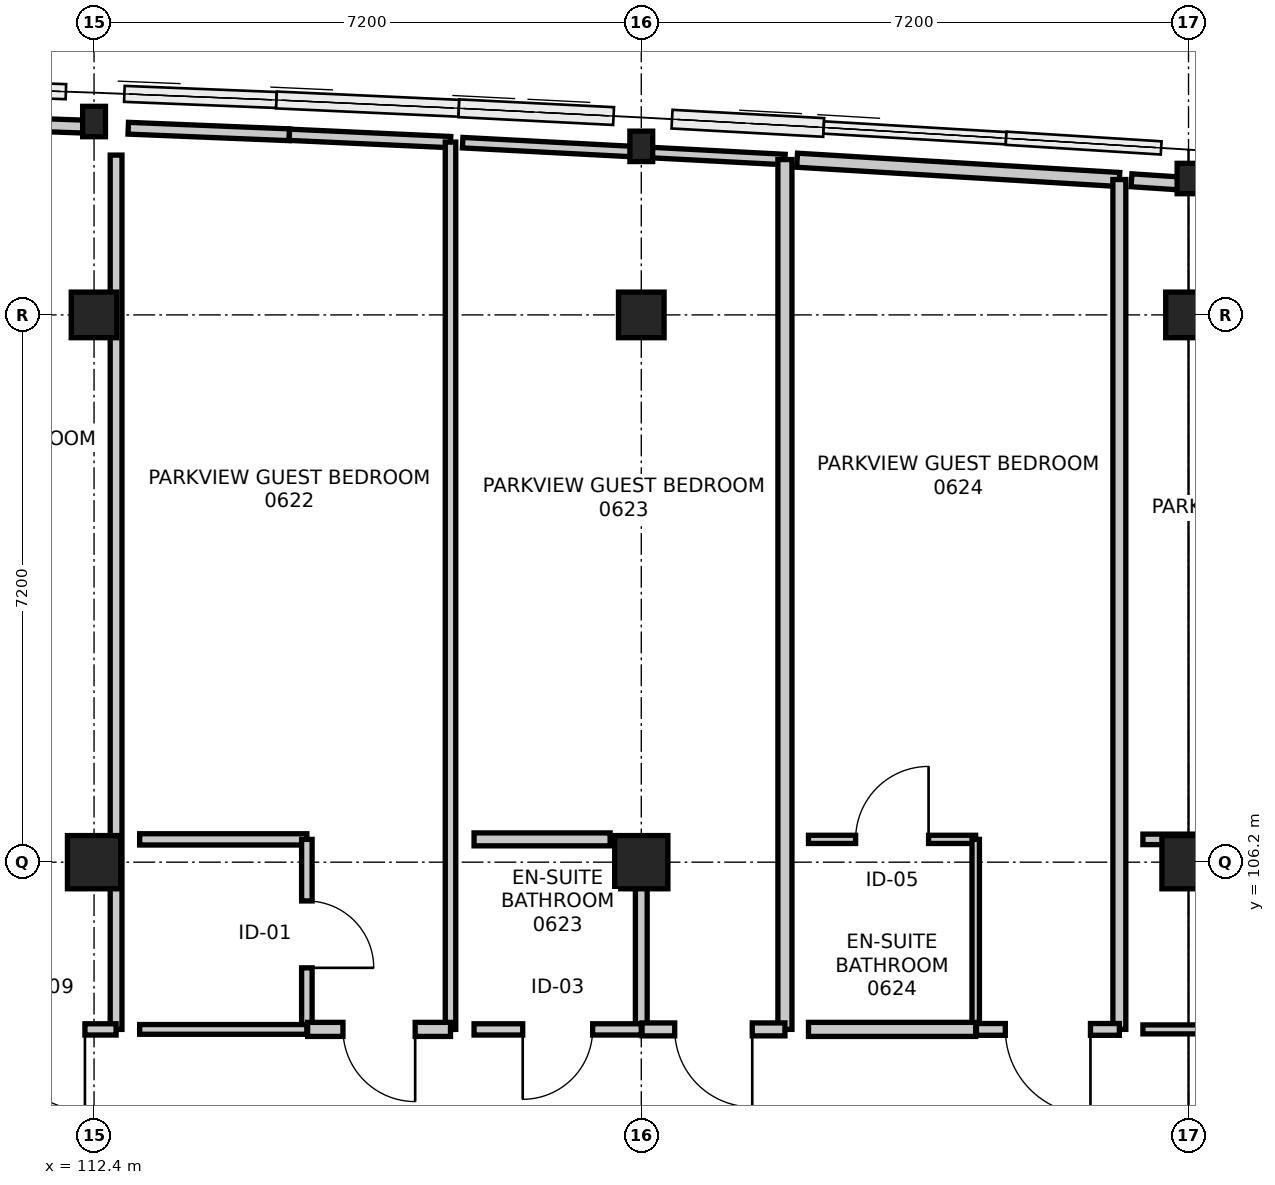
"""IFC4 building model, lengths in metres.
Left out: names, types, materials, properties, quantities, classifications, styles, units other than length and angle.
Written with IfcOpenShell. Run it as: python <this file> out.ifc"""

import sys

from ifc_helpers import new_model, si_unit, direction, frame, frame_2d, origin, origin_2d, place, context, subcontext, project, spatial, rectangle, i_section, extrude, element, fill, save


model = new_model("IFC4")
c1 = context("Model", 3, precision=1e-05, world=origin(), true_north=direction((0.0, 1.0)))
c2 = subcontext(c1, "Body", "Model", "MODEL_VIEW")
j1 = project(units=[si_unit("LENGTHUNIT", "METRE"), si_unit("PLANEANGLEUNIT", "RADIAN")], contexts=[c1])
p1 = place(None, origin())
s1 = spatial("IfcSite", under=j1, at=p1, CompositionType="ELEMENT")
p2 = place(p1, origin())
s2 = spatial("IfcBuilding", under=s1, at=p2, CompositionType="ELEMENT")
p3 = place(p2, frame((0.0, 0.0, 26.4)))
s3 = spatial("IfcBuildingStorey", under=s2, at=p3, CompositionType="ELEMENT", Elevation=26.4)
p4 = place(p3, frame((112.4, 106.2, 0.0), z_axis=(0.0, 0.0, 1.0), x_axis=(1.0, 0.0, 0.0)))
e1 = element("IfcColumn", 1, at=p4, inside=s3, PredefinedType="COLUMN", context=c2, shape_type="SweptSolid", body=[
    extrude(rectangle(XDim=0.7, YDim=0.7, at=origin_2d()), origin(), (0.0, 0.0, 1.0), 3.6),
])
p5 = place(p3, frame((112.4, 113.4, 0.0), z_axis=(0.0, 0.0, 1.0), x_axis=(1.0, 0.0, 0.0)))
e2 = element("IfcColumn", 2, at=p5, inside=s3, PredefinedType="COLUMN", context=c2, shape_type="SweptSolid", body=[
    extrude(rectangle(XDim=0.6, YDim=0.6, at=origin_2d()), origin(), (0.0, 0.0, 1.0), 3.6),
])
p6 = place(p3, frame((112.4, 115.944, 0.0), z_axis=(0.0, 0.0, 1.0), x_axis=(1.0, 0.0, 0.0)))
e3 = element("IfcColumn", 3, at=p6, inside=s3, PredefinedType="COLUMN", context=c2, shape_type="SweptSolid", body=[
    extrude(i_section(OverallWidth=0.3, OverallDepth=0.4, WebThickness=0.013, FlangeThickness=0.024, FilletRadius=0.027, at=origin_2d()), origin(), (0.0, 0.0, 1.0), 3.6),
])
p7 = place(p3, frame((119.6, 106.2, 0.0), z_axis=(0.0, 0.0, 1.0), x_axis=(1.0, 0.0, 0.0)))
e4 = element("IfcColumn", 4, at=p7, inside=s3, PredefinedType="COLUMN", context=c2, shape_type="SweptSolid", body=[
    extrude(rectangle(XDim=0.7, YDim=0.7, at=origin_2d()), origin(), (0.0, 0.0, 1.0), 3.6),
])
p8 = place(p3, frame((119.6, 113.4, 0.0), z_axis=(0.0, 0.0, 1.0), x_axis=(1.0, 0.0, 0.0)))
e5 = element("IfcColumn", 5, at=p8, inside=s3, PredefinedType="COLUMN", context=c2, shape_type="SweptSolid", body=[
    extrude(rectangle(XDim=0.6, YDim=0.6, at=origin_2d()), origin(), (0.0, 0.0, 1.0), 3.6),
])
p9 = place(p3, frame((119.6, 115.618, 0.0), z_axis=(0.0, 0.0, 1.0), x_axis=(1.0, 0.0, 0.0)))
e6 = element("IfcColumn", 6, at=p9, inside=s3, PredefinedType="COLUMN", context=c2, shape_type="SweptSolid", body=[
    extrude(i_section(OverallWidth=0.3, OverallDepth=0.4, WebThickness=0.013, FlangeThickness=0.024, FilletRadius=0.027, at=origin_2d()), origin(), (0.0, 0.0, 1.0), 3.6),
])
p10 = place(p3, frame((126.8, 106.2, 0.0), z_axis=(0.0, 0.0, 1.0), x_axis=(1.0, 0.0, 0.0)))
e7 = element("IfcColumn", 7, at=p10, inside=s3, PredefinedType="COLUMN", context=c2, shape_type="SweptSolid", body=[
    extrude(rectangle(XDim=0.7, YDim=0.7, at=origin_2d()), origin(), (0.0, 0.0, 1.0), 3.6),
])
p11 = place(p3, frame((126.8, 113.4, 0.0), z_axis=(0.0, 0.0, 1.0), x_axis=(1.0, 0.0, 0.0)))
e8 = element("IfcColumn", 8, at=p11, inside=s3, PredefinedType="COLUMN", context=c2, shape_type="SweptSolid", body=[
    extrude(rectangle(XDim=0.6, YDim=0.6, at=origin_2d()), origin(), (0.0, 0.0, 1.0), 3.6),
])
p12 = place(p3, frame((126.8, 115.194, 0.0), z_axis=(0.0, 0.0, 1.0), x_axis=(1.0, 0.0, 0.0)))
e9 = element("IfcColumn", 9, at=p12, inside=s3, PredefinedType="COLUMN", context=c2, shape_type="SweptSolid", body=[
    extrude(i_section(OverallWidth=0.3, OverallDepth=0.4, WebThickness=0.013, FlangeThickness=0.024, FilletRadius=0.027, at=origin_2d()), origin(), (0.0, 0.0, 1.0), 3.6),
])
p13 = place(p3, frame((110.57, 115.937, 0.0), z_axis=(0.0, 0.0, 1.0), x_axis=(0.999375154514, -0.035345445825, 0.0)))
e10 = element("IfcWall", 10, at=p13, inside=s3, PredefinedType="PARTITIONING", context=c2, shape_type="SweptSolid", body=[
    extrude(rectangle(XDim=1.761, YDim=0.17, at=frame_2d((0.881, 0.0))), origin(), (0.0, 0.0, 1.0), 2.926),
])
p14 = place(p3, frame((112.69, 115.502, 0.0), z_axis=(0.0, 0.0, 1.0), x_axis=(0.0, -1.0, 0.0)))
e11 = element("IfcWall", 11, at=p14, inside=s3, PredefinedType="PARTITIONING", context=c2, shape_type="SweptSolid", body=[
    extrude(rectangle(XDim=11.502, YDim=0.155, at=frame_2d((5.751, 0.0))), origin(), (0.0, 0.0, 1.0), 2.685),
])
p15 = place(p3, frame((112.69, 104.0, 0.0), z_axis=(0.0, 0.0, 1.0), x_axis=(-1.0, 0.0, 0.0)))
e12 = element("IfcWall", 12, at=p15, inside=s3, PredefinedType="PARTITIONING", context=c2, shape_type="SweptSolid", body=[
    extrude(rectangle(XDim=1.88, YDim=0.148, at=frame_2d((0.94, 0.0))), origin(), (0.0, 0.0, 1.0), 2.685),
])
p16 = place(p15, frame((0.41, 0.0, 0.0)))
e13 = element("IfcOpeningElement", 13, at=p16, cuts=e12, PredefinedType="OPENING", context=c2, shape_type="SweptSolid", body=[
    extrude(rectangle(XDim=1.06, YDim=2.2, at=frame_2d((0.53, 1.1))), frame((0.0, 0.084, 0.0), z_axis=(0.0, -1.0, 0.0), x_axis=(1.0, 0.0, 0.0)), (0.0, 0.0, 1.0), 0.168),
])
p17 = place(p3, frame((113.0, 106.5, 0.0), z_axis=(0.0, 0.0, 1.0), x_axis=(1.0, 0.0, 0.0)))
e14 = element("IfcWall", 14, at=p17, inside=s3, PredefinedType="PARTITIONING", context=c2, shape_type="SweptSolid", body=[
    extrude(rectangle(XDim=2.2, YDim=0.148, at=frame_2d((1.1, 0.0))), origin(), (0.0, 0.0, 1.0), 3.35),
])
p18 = place(p3, frame((115.2, 106.5, 0.0), z_axis=(0.0, 0.0, 1.0), x_axis=(0.0, -1.0, 0.0)))
e15 = element("IfcWall", 15, at=p18, inside=s3, PredefinedType="PARTITIONING", context=c2, shape_type="SweptSolid", body=[
    extrude(rectangle(XDim=2.5, YDim=0.138, at=frame_2d((1.25, 0.0))), origin(), (0.0, 0.0, 1.0), 2.735),
])
p19 = place(p18, frame((0.81, 0.0, 0.0)))
e16 = element("IfcOpeningElement", 16, at=p19, cuts=e15, PredefinedType="OPENING", context=c2, shape_type="SweptSolid", body=[
    extrude(rectangle(XDim=0.88, YDim=2.06, at=frame_2d((0.44, 1.03))), frame((0.0, 0.079, 0.0), z_axis=(0.0, -1.0, 0.0), x_axis=(1.0, 0.0, 0.0)), (0.0, 0.0, 1.0), 0.158),
])
p20 = place(p3, frame((115.2, 104.0, 0.0), z_axis=(0.0, 0.0, 1.0), x_axis=(-1.0, 0.0, 0.0)))
e17 = element("IfcWall", 17, at=p20, inside=s3, PredefinedType="PARTITIONING", context=c2, shape_type="SweptSolid", body=[
    extrude(rectangle(XDim=2.2, YDim=0.128, at=frame_2d((1.1, 0.0))), origin(), (0.0, 0.0, 1.0), 3.35),
])
p21 = place(p3, frame((112.85, 115.856, 0.0), z_axis=(0.0, 0.0, 1.0), x_axis=(0.999174642918, -0.040620597599, 0.0)))
e18 = element("IfcWall", 18, at=p21, inside=s3, PredefinedType="PARTITIONING", context=c2, shape_type="SweptSolid", body=[
    extrude(rectangle(XDim=2.122, YDim=0.155, at=frame_2d((1.061, 0.0))), origin(), (0.0, 0.0, 1.0), 2.926),
])
p22 = place(p3, frame((114.97, 115.77, 0.0), z_axis=(0.0, 0.0, 1.0), x_axis=(0.998972331722, -0.045324170739, 0.0)))
e19 = element("IfcWall", 19, at=p22, inside=s3, PredefinedType="PARTITIONING", context=c2, shape_type="SweptSolid", body=[
    extrude(rectangle(XDim=2.122, YDim=0.148, at=frame_2d((1.061, 0.0))), origin(), (0.0, 0.0, 1.0), 2.926),
])
p23 = place(p3, frame((117.09, 115.674, 0.0), z_axis=(0.0, 0.0, 1.0), x_axis=(0.0, -1.0, 0.0)))
e20 = element("IfcWall", 20, at=p23, inside=s3, PredefinedType="PARTITIONING", context=c2, shape_type="SweptSolid", body=[
    extrude(rectangle(XDim=11.674, YDim=0.138, at=frame_2d((5.837, 0.0))), origin(), (0.0, 0.0, 1.0), 2.735),
])
p24 = place(p3, frame((117.09, 104.0, 0.0), z_axis=(0.0, 0.0, 1.0), x_axis=(-1.0, 0.0, 0.0)))
e21 = element("IfcWall", 21, at=p24, inside=s3, PredefinedType="PARTITIONING", context=c2, shape_type="SweptSolid", body=[
    extrude(rectangle(XDim=1.88, YDim=0.185, at=frame_2d((0.94, 0.0))), origin(), (0.0, 0.0, 1.0), 3.35),
])
p25 = place(p24, frame((0.465, 0.0, 0.0)))
e22 = element("IfcOpeningElement", 22, at=p25, cuts=e21, PredefinedType="OPENING", context=c2, shape_type="SweptSolid", body=[
    extrude(rectangle(XDim=0.95, YDim=2.1, at=frame_2d((0.475, 1.05))), frame((0.0, 0.103, 0.0), z_axis=(0.0, -1.0, 0.0), x_axis=(1.0, 0.0, 0.0)), (0.0, 0.0, 1.0), 0.205),
])
p26 = place(p3, frame((117.4, 106.5, 0.0), z_axis=(0.0, 0.0, 1.0), x_axis=(1.0, 0.0, 0.0)))
e23 = element("IfcWall", 23, at=p26, inside=s3, PredefinedType="PARTITIONING", context=c2, shape_type="SweptSolid", body=[
    extrude(rectangle(XDim=1.79, YDim=0.17, at=frame_2d((0.895, 0.0))), origin(), (0.0, 0.0, 1.0), 2.735),
])
p27 = place(p3, frame((119.6, 106.09, 0.0), z_axis=(0.0, 0.0, 1.0), x_axis=(0.0, -1.0, 0.0)))
e24 = element("IfcWall", 24, at=p27, inside=s3, PredefinedType="PARTITIONING", context=c2, shape_type="SweptSolid", body=[
    extrude(rectangle(XDim=2.09, YDim=0.155, at=frame_2d((1.045, 0.0))), origin(), (0.0, 0.0, 1.0), 2.685),
])
p28 = place(p3, frame((119.6, 104.0, 0.0), z_axis=(0.0, 0.0, 1.0), x_axis=(-1.0, 0.0, 0.0)))
e25 = element("IfcWall", 25, at=p28, inside=s3, PredefinedType="PARTITIONING", context=c2, shape_type="SweptSolid", body=[
    extrude(rectangle(XDim=2.2, YDim=0.148, at=frame_2d((1.1, 0.0))), origin(), (0.0, 0.0, 1.0), 2.685),
])
p29 = place(p28, frame((0.64, 0.0, 0.0)))
e26 = element("IfcOpeningElement", 26, at=p29, cuts=e25, PredefinedType="OPENING", context=c2, shape_type="SweptSolid", body=[
    extrude(rectangle(XDim=0.92, YDim=2.1, at=frame_2d((0.46, 1.05))), frame((0.0, 0.084, 0.0), z_axis=(0.0, -1.0, 0.0), x_axis=(1.0, 0.0, 0.0)), (0.0, 0.0, 1.0), 0.168),
])
p30 = place(p3, frame((117.25, 115.666, 0.0), z_axis=(0.0, 0.0, 1.0), x_axis=(0.998630033293, -0.052326442696, 0.0)))
e27 = element("IfcWall", 27, at=p30, inside=s3, PredefinedType="PARTITIONING", context=c2, shape_type="SweptSolid", body=[
    extrude(rectangle(XDim=4.246, YDim=0.138, at=frame_2d((2.123, 0.0))), origin(), (0.0, 0.0, 1.0), 2.926),
])
p31 = place(p3, frame((121.49, 115.444, 0.0), z_axis=(0.0, 0.0, 1.0), x_axis=(0.0, -1.0, 0.0)))
e28 = element("IfcWall", 28, at=p31, inside=s3, PredefinedType="PARTITIONING", context=c2, shape_type="SweptSolid", body=[
    extrude(rectangle(XDim=11.444, YDim=0.185, at=frame_2d((5.722, 0.0))), origin(), (0.0, 0.0, 1.0), 2.735),
])
p32 = place(p3, frame((121.49, 104.0, 0.0), z_axis=(0.0, 0.0, 1.0), x_axis=(-1.0, 0.0, 0.0)))
e29 = element("IfcWall", 29, at=p32, inside=s3, PredefinedType="PARTITIONING", context=c2, shape_type="SweptSolid", body=[
    extrude(rectangle(XDim=1.88, YDim=0.17, at=frame_2d((0.94, 0.0))), origin(), (0.0, 0.0, 1.0), 2.685),
])
p33 = place(p32, frame((0.43, 0.0, 0.0)))
e30 = element("IfcOpeningElement", 30, at=p33, cuts=e29, PredefinedType="OPENING", context=c2, shape_type="SweptSolid", body=[
    extrude(rectangle(XDim=1.02, YDim=2.15, at=frame_2d((0.51, 1.075))), frame((0.0, 0.095, 0.0), z_axis=(0.0, -1.0, 0.0), x_axis=(1.0, 0.0, 0.0)), (0.0, 0.0, 1.0), 0.19),
])
p34 = place(p3, frame((121.8, 106.5, 0.0), z_axis=(0.0, 0.0, 1.0), x_axis=(1.0, 0.0, 0.0)))
e31 = element("IfcWall", 31, at=p34, inside=s3, PredefinedType="PARTITIONING", context=c2, shape_type="SweptSolid", body=[
    extrude(rectangle(XDim=2.2, YDim=0.108, at=frame_2d((1.1, 0.0))), origin(), (0.0, 0.0, 1.0), 3.35),
])
p35 = place(p34, frame((0.62, 0.0, 0.0)))
e32 = element("IfcOpeningElement", 32, at=p35, cuts=e31, PredefinedType="OPENING", context=c2, shape_type="SweptSolid", body=[
    extrude(rectangle(XDim=0.96, YDim=2.14, at=frame_2d((0.48, 1.07))), frame((0.0, 0.064, 0.0), z_axis=(0.0, -1.0, 0.0), x_axis=(1.0, 0.0, 0.0)), (0.0, 0.0, 1.0), 0.128),
])
p36 = place(p3, frame((124.0, 106.5, 0.0), z_axis=(0.0, 0.0, 1.0), x_axis=(0.0, -1.0, 0.0)))
e33 = element("IfcWall", 33, at=p36, inside=s3, PredefinedType="PARTITIONING", context=c2, shape_type="SweptSolid", body=[
    extrude(rectangle(XDim=2.5, YDim=0.098, at=frame_2d((1.25, 0.0))), origin(), (0.0, 0.0, 1.0), 2.735),
])
p37 = place(p3, frame((124.0, 104.0, 0.0), z_axis=(0.0, 0.0, 1.0), x_axis=(-1.0, 0.0, 0.0)))
e34 = element("IfcWall", 34, at=p37, inside=s3, PredefinedType="PARTITIONING", context=c2, shape_type="SweptSolid", body=[
    extrude(rectangle(XDim=2.2, YDim=0.185, at=frame_2d((1.1, 0.0))), origin(), (0.0, 0.0, 1.0), 3.35),
])
p38 = place(p3, frame((121.65, 115.435, 0.0), z_axis=(0.0, 0.0, 1.0), x_axis=(0.998211780047, -0.059776602248, 0.0)))
e35 = element("IfcWall", 35, at=p38, inside=s3, PredefinedType="PARTITIONING", context=c2, shape_type="SweptSolid", body=[
    extrude(rectangle(XDim=4.248, YDim=0.185, at=frame_2d((2.124, 0.0))), origin(), (0.0, 0.0, 1.0), 2.926),
])
p39 = place(p3, frame((125.89, 115.181, 0.0), z_axis=(0.0, 0.0, 1.0), x_axis=(0.0, -1.0, 0.0)))
e36 = element("IfcWall", 36, at=p39, inside=s3, PredefinedType="PARTITIONING", context=c2, shape_type="SweptSolid", body=[
    extrude(rectangle(XDim=11.181, YDim=0.17, at=frame_2d((5.591, 0.0))), origin(), (0.0, 0.0, 1.0), 2.735),
])
p40 = place(p3, frame((125.89, 104.0, 0.0), z_axis=(0.0, 0.0, 1.0), x_axis=(-1.0, 0.0, 0.0)))
e37 = element("IfcWall", 37, at=p40, inside=s3, PredefinedType="PARTITIONING", context=c2, shape_type="SweptSolid", body=[
    extrude(rectangle(XDim=1.88, YDim=0.155, at=frame_2d((0.94, 0.0))), origin(), (0.0, 0.0, 1.0), 3.35),
])
p41 = place(p40, frame((0.38, 0.0, 0.0)))
e38 = element("IfcOpeningElement", 38, at=p41, cuts=e37, PredefinedType="OPENING", context=c2, shape_type="SweptSolid", body=[
    extrude(rectangle(XDim=1.12, YDim=2.2, at=frame_2d((0.56, 1.1))), frame((0.0, 0.087, 0.0), z_axis=(0.0, -1.0, 0.0), x_axis=(1.0, 0.0, 0.0)), (0.0, 0.0, 1.0), 0.175),
])
p42 = place(p3, frame((126.2, 106.5, 0.0), z_axis=(0.0, 0.0, 1.0), x_axis=(1.0, 0.0, 0.0)))
e39 = element("IfcWall", 39, at=p42, inside=s3, PredefinedType="PARTITIONING", context=c2, shape_type="SweptSolid", body=[
    extrude(rectangle(XDim=2.2, YDim=0.138, at=frame_2d((1.1, 0.0))), origin(), (0.0, 0.0, 1.0), 2.685),
])
p43 = place(p3, frame((128.4, 104.0, 0.0), z_axis=(0.0, 0.0, 1.0), x_axis=(-1.0, 0.0, 0.0)))
e40 = element("IfcWall", 40, at=p43, inside=s3, PredefinedType="PARTITIONING", context=c2, shape_type="SweptSolid", body=[
    extrude(rectangle(XDim=2.2, YDim=0.118, at=frame_2d((1.1, 0.0))), origin(), (0.0, 0.0, 1.0), 2.685),
])
p44 = place(p3, frame((126.05, 115.171, 0.0), z_axis=(0.0, 0.0, 1.0), x_axis=(0.997852518731, -0.065500769929, 0.0)))
e41 = element("IfcWall", 41, at=p44, inside=s3, PredefinedType="PARTITIONING", context=c2, shape_type="SweptSolid", body=[
    extrude(rectangle(XDim=4.249, YDim=0.17, at=frame_2d((2.125, 0.0))), origin(), (0.0, 0.0, 1.0), 2.926),
])
p45 = place(p16, origin())
e42 = element("IfcDoor", 42, at=p45, inside=s3, OperationType="SINGLE_SWING_LEFT", PredefinedType="DOOR", context=c2, shape_type="SweptSolid", body=[
    extrude(rectangle(XDim=1.06, YDim=2.2, at=frame_2d((0.53, 1.1))), frame((0.0, 0.025, 0.0), z_axis=(0.0, -1.0, 0.0), x_axis=(1.0, 0.0, 0.0)), (0.0, 0.0, 1.0), 0.05),
])
fill(e13, e42)
p46 = place(p19, origin())
e43 = element("IfcDoor", 43, at=p46, inside=s3, OperationType="SINGLE_SWING_RIGHT", PredefinedType="DOOR", context=c2, shape_type="SweptSolid", body=[
    extrude(rectangle(XDim=0.88, YDim=2.06, at=frame_2d((0.44, 1.03))), frame((0.0, 0.025, 0.0), z_axis=(0.0, -1.0, 0.0), x_axis=(1.0, 0.0, 0.0)), (0.0, 0.0, 1.0), 0.05),
])
fill(e16, e43)
p47 = place(p25, origin())
e44 = element("IfcDoor", 44, at=p47, inside=s3, OperationType="SINGLE_SWING_LEFT", PredefinedType="DOOR", context=c2, shape_type="SweptSolid", body=[
    extrude(rectangle(XDim=0.95, YDim=2.1, at=frame_2d((0.475, 1.05))), frame((0.0, 0.025, 0.0), z_axis=(0.0, -1.0, 0.0), x_axis=(1.0, 0.0, 0.0)), (0.0, 0.0, 1.0), 0.05),
])
fill(e22, e44)
p48 = place(p29, origin())
e45 = element("IfcDoor", 45, at=p48, inside=s3, OperationType="SINGLE_SWING_RIGHT", PredefinedType="DOOR", context=c2, shape_type="SweptSolid", body=[
    extrude(rectangle(XDim=0.92, YDim=2.1, at=frame_2d((0.46, 1.05))), frame((0.0, 0.025, 0.0), z_axis=(0.0, -1.0, 0.0), x_axis=(1.0, 0.0, 0.0)), (0.0, 0.0, 1.0), 0.05),
])
fill(e26, e45)
p49 = place(p33, origin())
e46 = element("IfcDoor", 46, at=p49, inside=s3, OperationType="SINGLE_SWING_LEFT", PredefinedType="DOOR", context=c2, shape_type="SweptSolid", body=[
    extrude(rectangle(XDim=1.02, YDim=2.15, at=frame_2d((0.51, 1.075))), frame((0.0, 0.025, 0.0), z_axis=(0.0, -1.0, 0.0), x_axis=(1.0, 0.0, 0.0)), (0.0, 0.0, 1.0), 0.05),
])
fill(e30, e46)
p50 = place(p35, origin())
e47 = element("IfcDoor", 47, at=p50, inside=s3, OperationType="SINGLE_SWING_RIGHT", PredefinedType="DOOR", context=c2, shape_type="SweptSolid", body=[
    extrude(rectangle(XDim=0.96, YDim=2.14, at=frame_2d((0.48, 1.07))), frame((0.0, 0.025, 0.0), z_axis=(0.0, -1.0, 0.0), x_axis=(1.0, 0.0, 0.0)), (0.0, 0.0, 1.0), 0.05),
])
fill(e32, e47)
p51 = place(p41, origin())
e48 = element("IfcDoor", 48, at=p51, inside=s3, OperationType="SINGLE_SWING_LEFT", PredefinedType="DOOR", context=c2, shape_type="SweptSolid", body=[
    extrude(rectangle(XDim=1.12, YDim=2.2, at=frame_2d((0.56, 1.1))), frame((0.0, 0.025, 0.0), z_axis=(0.0, -1.0, 0.0), x_axis=(1.0, 0.0, 0.0)), (0.0, 0.0, 1.0), 0.05),
])
fill(e38, e48)
save(model, sys.argv[1])
